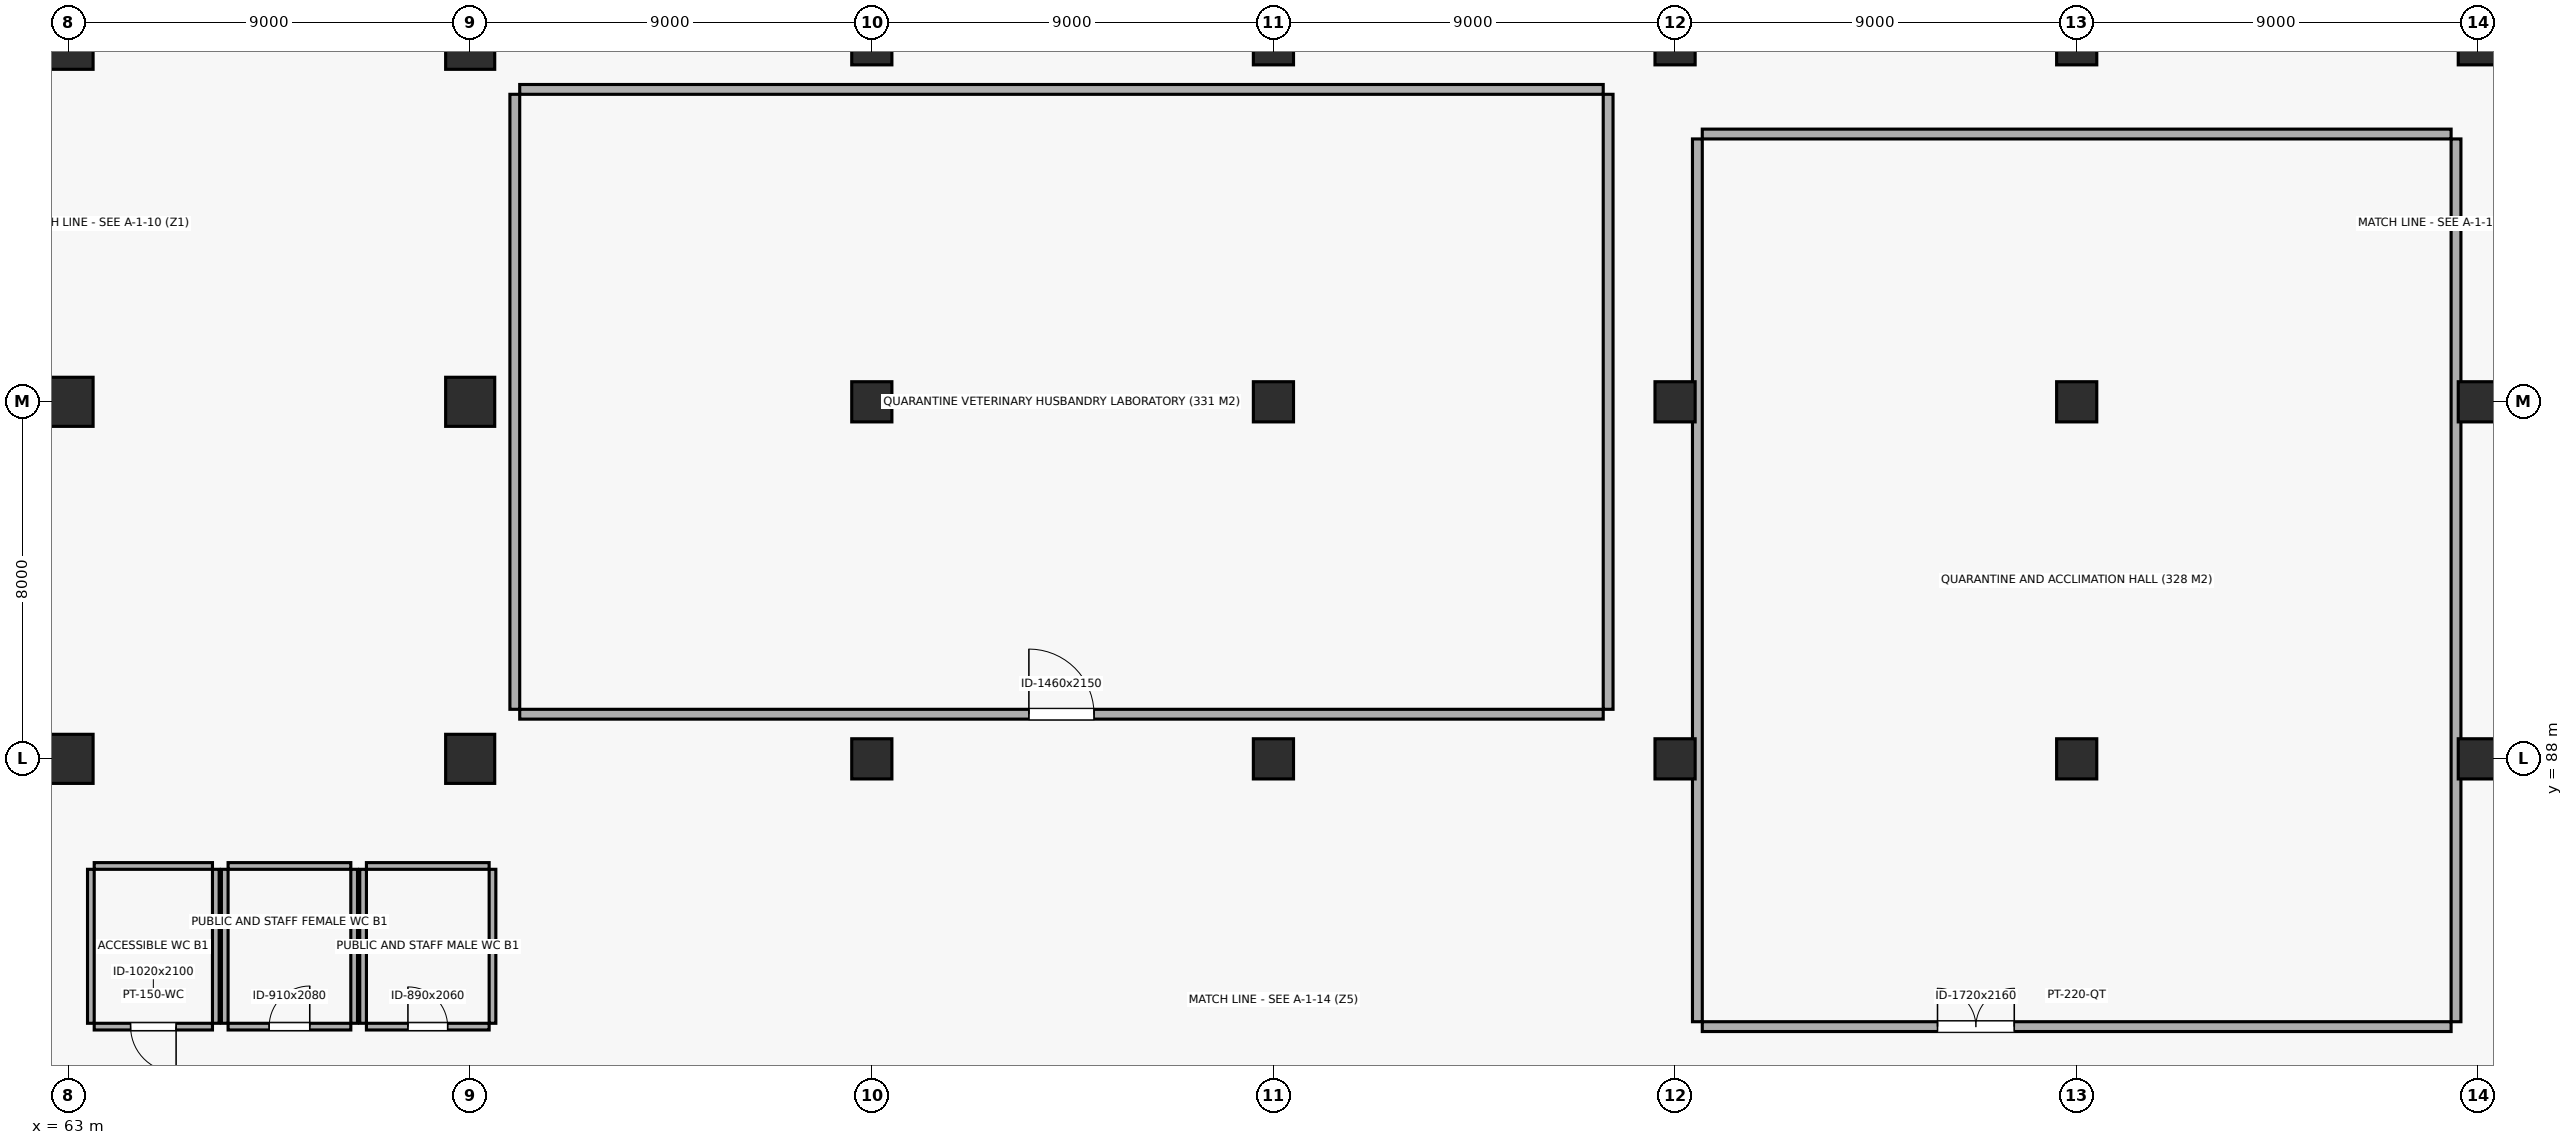
"""IFC4 building model, lengths in metres.
Left out: names, types, materials, properties, quantities, classifications, styles, units other than length and angle.
Written with IfcOpenShell. Run it as: python <this file> out.ifc"""

import sys

from ifc_helpers import new_model, si_unit, direction, frame, frame_2d, origin, origin_2d, place, context, subcontext, project, spatial, rectangle, extrude, element, fill, save


model = new_model("IFC4")
c1 = context("Model", 3, precision=1e-05, world=origin(), true_north=direction((0.0, 1.0)))
c2 = subcontext(c1, "Body", "Model", "MODEL_VIEW")
j1 = project(units=[si_unit("LENGTHUNIT", "METRE"), si_unit("PLANEANGLEUNIT", "RADIAN")], contexts=[c1])
p1 = place(None, origin())
s1 = spatial("IfcSite", under=j1, at=p1, CompositionType="ELEMENT")
p2 = place(p1, origin())
s2 = spatial("IfcBuilding", under=s1, at=p2, CompositionType="ELEMENT")
p3 = place(p2, frame((0.0, 0.0, -4.5)))
s3 = spatial("IfcBuildingStorey", under=s2, at=p3, CompositionType="ELEMENT", Elevation=-4.5)
for number, where, z_axis, x_axis in (
    (1, (63.0, 88.0, 0.0), (0.0, 0.0, 1.0), (1.0, 0.0, 0.0)),
    (2, (63.0, 96.0, 0.0), (0.0, 0.0, 1.0), (1.0, 0.0, 0.0)),
    (3, (63.0, 104.0, 0.0), (0.0, 0.0, 1.0), (1.0, 0.0, 0.0)),
    (4, (72.0, 88.0, 0.0), (0.0, 0.0, 1.0), (1.0, 0.0, 0.0)),
    (5, (72.0, 96.0, 0.0), (0.0, 0.0, 1.0), (1.0, 0.0, 0.0)),
    (6, (72.0, 104.0, 0.0), (0.0, 0.0, 1.0), (1.0, 0.0, 0.0)),
):
    element("IfcColumn", number, at=place(p3, frame(where, z_axis=z_axis, x_axis=x_axis)), inside=s3, PredefinedType="COLUMN", context=c2, shape_type="SweptSolid", body=[
        extrude(rectangle(XDim=1.1, YDim=1.1, at=origin_2d()), origin(), (0.0, 0.0, 1.0), 4.5),
    ])
for number, where, z_axis, x_axis in (
    (7, (81.0, 88.0, 0.0), (0.0, 0.0, 1.0), (1.0, 0.0, 0.0)),
    (8, (81.0, 96.0, 0.0), (0.0, 0.0, 1.0), (1.0, 0.0, 0.0)),
    (9, (81.0, 104.0, 0.0), (0.0, 0.0, 1.0), (1.0, 0.0, 0.0)),
    (10, (90.0, 88.0, 0.0), (0.0, 0.0, 1.0), (1.0, 0.0, 0.0)),
    (11, (90.0, 96.0, 0.0), (0.0, 0.0, 1.0), (1.0, 0.0, 0.0)),
    (12, (90.0, 104.0, 0.0), (0.0, 0.0, 1.0), (1.0, 0.0, 0.0)),
    (13, (99.0, 88.0, 0.0), (0.0, 0.0, 1.0), (1.0, 0.0, 0.0)),
    (14, (99.0, 96.0, 0.0), (0.0, 0.0, 1.0), (1.0, 0.0, 0.0)),
    (15, (99.0, 104.0, 0.0), (0.0, 0.0, 1.0), (1.0, 0.0, 0.0)),
    (16, (108.0, 88.0, 0.0), (0.0, 0.0, 1.0), (1.0, 0.0, 0.0)),
    (17, (108.0, 96.0, 0.0), (0.0, 0.0, 1.0), (1.0, 0.0, 0.0)),
    (18, (108.0, 104.0, 0.0), (0.0, 0.0, 1.0), (1.0, 0.0, 0.0)),
    (19, (117.0, 88.0, 0.0), (0.0, 0.0, 1.0), (1.0, 0.0, 0.0)),
    (20, (117.0, 96.0, 0.0), (0.0, 0.0, 1.0), (1.0, 0.0, 0.0)),
    (21, (117.0, 104.0, 0.0), (0.0, 0.0, 1.0), (1.0, 0.0, 0.0)),
):
    element("IfcColumn", number, at=place(p3, frame(where, z_axis=z_axis, x_axis=x_axis)), inside=s3, PredefinedType="COLUMN", context=c2, shape_type="SweptSolid", body=[
        extrude(rectangle(XDim=0.9, YDim=0.9, at=origin_2d()), origin(), (0.0, 0.0, 1.0), 4.5),
    ])
p4 = place(p3, frame((99.61, 82.0, 0.0), z_axis=(0.0, 0.0, 1.0), x_axis=(1.0, 0.0, 0.0)))
e22 = element("IfcWall", 22, at=p4, inside=s3, PredefinedType="PARTITIONING", context=c2, shape_type="SweptSolid", body=[
    extrude(rectangle(XDim=16.78, YDim=0.22, at=frame_2d((8.39, 0.0))), origin(), (0.0, 0.0, 1.0), 4.15),
])
p5 = place(p4, frame((5.271, 0.0, 0.0)))
e23 = element("IfcOpeningElement", 23, at=p5, cuts=e22, PredefinedType="OPENING", context=c2, shape_type="SweptSolid", body=[
    extrude(rectangle(XDim=1.72, YDim=2.16, at=frame_2d((0.86, 1.08))), frame((0.0, 0.122, 0.0), z_axis=(0.0, -1.0, 0.0), x_axis=(1.0, 0.0, 0.0)), (0.0, 0.0, 1.0), 0.244),
])
p6 = place(p3, frame((99.61, 102.0, 0.0), z_axis=(0.0, 0.0, 1.0), x_axis=(1.0, 0.0, 0.0)))
e24 = element("IfcWall", 24, at=p6, inside=s3, PredefinedType="PARTITIONING", context=c2, shape_type="SweptSolid", body=[
    extrude(rectangle(XDim=16.78, YDim=0.22, at=frame_2d((8.39, 0.0))), origin(), (0.0, 0.0, 1.0), 4.15),
])
for number, where, z_axis, x_axis in (
    (25, (99.5, 82.11, 0.0), (0.0, 0.0, 1.0), (0.0, 1.0, 0.0)),
    (26, (116.5, 82.11, 0.0), (0.0, 0.0, 1.0), (0.0, 1.0, 0.0)),
):
    element("IfcWall", number, at=place(p3, frame(where, z_axis=z_axis, x_axis=x_axis)), inside=s3, PredefinedType="PARTITIONING", context=c2, shape_type="SweptSolid", body=[
        extrude(rectangle(XDim=19.78, YDim=0.22, at=frame_2d((9.89, 0.0))), origin(), (0.0, 0.0, 1.0), 4.15),
    ])
p7 = place(p3, frame((73.11, 89.0, 0.0), z_axis=(0.0, 0.0, 1.0), x_axis=(1.0, 0.0, 0.0)))
e27 = element("IfcWall", 27, at=p7, inside=s3, PredefinedType="PARTITIONING", context=c2, shape_type="SweptSolid", body=[
    extrude(rectangle(XDim=24.28, YDim=0.22, at=frame_2d((12.14, 0.0))), origin(), (0.0, 0.0, 1.0), 4.15),
])
p8 = place(p7, frame((11.41, 0.0, 0.0)))
e28 = element("IfcOpeningElement", 28, at=p8, cuts=e27, PredefinedType="OPENING", context=c2, shape_type="SweptSolid", body=[
    extrude(rectangle(XDim=1.46, YDim=2.15, at=frame_2d((0.73, 1.075))), frame((0.0, 0.122, 0.0), z_axis=(0.0, -1.0, 0.0), x_axis=(1.0, 0.0, 0.0)), (0.0, 0.0, 1.0), 0.244),
])
p9 = place(p3, frame((73.11, 103.0, 0.0), z_axis=(0.0, 0.0, 1.0), x_axis=(1.0, 0.0, 0.0)))
e29 = element("IfcWall", 29, at=p9, inside=s3, PredefinedType="PARTITIONING", context=c2, shape_type="SweptSolid", body=[
    extrude(rectangle(XDim=24.28, YDim=0.22, at=frame_2d((12.14, 0.0))), origin(), (0.0, 0.0, 1.0), 4.15),
])
for number, where, z_axis, x_axis in (
    (30, (73.0, 89.11, 0.0), (0.0, 0.0, 1.0), (0.0, 1.0, 0.0)),
    (31, (97.5, 89.11, 0.0), (0.0, 0.0, 1.0), (0.0, 1.0, 0.0)),
):
    element("IfcWall", number, at=place(p3, frame(where, z_axis=z_axis, x_axis=x_axis)), inside=s3, PredefinedType="PARTITIONING", context=c2, shape_type="SweptSolid", body=[
        extrude(rectangle(XDim=13.78, YDim=0.22, at=frame_2d((6.89, 0.0))), origin(), (0.0, 0.0, 1.0), 4.15),
    ])
p10 = place(p3, frame((63.575, 82.0, 0.0), z_axis=(0.0, 0.0, 1.0), x_axis=(1.0, 0.0, 0.0)))
e32 = element("IfcWall", 32, at=p10, inside=s3, PredefinedType="PARTITIONING", context=c2, shape_type="SweptSolid", body=[
    extrude(rectangle(XDim=2.65, YDim=0.15, at=frame_2d((1.325, 0.0))), origin(), (0.0, 0.0, 1.0), 4.15),
])
p11 = place(p10, frame((0.815, 0.0, 0.0)))
e33 = element("IfcOpeningElement", 33, at=p11, cuts=e32, PredefinedType="OPENING", context=c2, shape_type="SweptSolid", body=[
    extrude(rectangle(XDim=1.02, YDim=2.1, at=frame_2d((0.51, 1.05))), frame((0.0, 0.087, 0.0), z_axis=(0.0, -1.0, 0.0), x_axis=(1.0, 0.0, 0.0)), (0.0, 0.0, 1.0), 0.174),
])
p12 = place(p3, frame((63.575, 85.6, 0.0), z_axis=(0.0, 0.0, 1.0), x_axis=(1.0, 0.0, 0.0)))
e34 = element("IfcWall", 34, at=p12, inside=s3, PredefinedType="PARTITIONING", context=c2, shape_type="SweptSolid", body=[
    extrude(rectangle(XDim=2.65, YDim=0.15, at=frame_2d((1.325, 0.0))), origin(), (0.0, 0.0, 1.0), 4.15),
])
for number, where, z_axis, x_axis in (
    (35, (63.5, 82.075, 0.0), (0.0, 0.0, 1.0), (0.0, 1.0, 0.0)),
    (36, (66.3, 82.075, 0.0), (0.0, 0.0, 1.0), (0.0, 1.0, 0.0)),
):
    element("IfcWall", number, at=place(p3, frame(where, z_axis=z_axis, x_axis=x_axis)), inside=s3, PredefinedType="PARTITIONING", context=c2, shape_type="SweptSolid", body=[
        extrude(rectangle(XDim=3.45, YDim=0.15, at=frame_2d((1.725, 0.0))), origin(), (0.0, 0.0, 1.0), 4.15),
    ])
p13 = place(p3, frame((66.575, 82.0, 0.0), z_axis=(0.0, 0.0, 1.0), x_axis=(1.0, 0.0, 0.0)))
e37 = element("IfcWall", 37, at=p13, inside=s3, PredefinedType="PARTITIONING", context=c2, shape_type="SweptSolid", body=[
    extrude(rectangle(XDim=2.75, YDim=0.15, at=frame_2d((1.375, 0.0))), origin(), (0.0, 0.0, 1.0), 4.15),
])
p14 = place(p13, frame((0.92, 0.0, 0.0)))
e38 = element("IfcOpeningElement", 38, at=p14, cuts=e37, PredefinedType="OPENING", context=c2, shape_type="SweptSolid", body=[
    extrude(rectangle(XDim=0.91, YDim=2.08, at=frame_2d((0.455, 1.04))), frame((0.0, 0.087, 0.0), z_axis=(0.0, -1.0, 0.0), x_axis=(1.0, 0.0, 0.0)), (0.0, 0.0, 1.0), 0.174),
])
p15 = place(p3, frame((66.575, 85.6, 0.0), z_axis=(0.0, 0.0, 1.0), x_axis=(1.0, 0.0, 0.0)))
e39 = element("IfcWall", 39, at=p15, inside=s3, PredefinedType="PARTITIONING", context=c2, shape_type="SweptSolid", body=[
    extrude(rectangle(XDim=2.75, YDim=0.15, at=frame_2d((1.375, 0.0))), origin(), (0.0, 0.0, 1.0), 4.15),
])
for number, where, z_axis, x_axis in (
    (40, (66.5, 82.075, 0.0), (0.0, 0.0, 1.0), (0.0, 1.0, 0.0)),
    (41, (69.4, 82.075, 0.0), (0.0, 0.0, 1.0), (0.0, 1.0, 0.0)),
):
    element("IfcWall", number, at=place(p3, frame(where, z_axis=z_axis, x_axis=x_axis)), inside=s3, PredefinedType="PARTITIONING", context=c2, shape_type="SweptSolid", body=[
        extrude(rectangle(XDim=3.45, YDim=0.15, at=frame_2d((1.725, 0.0))), origin(), (0.0, 0.0, 1.0), 4.15),
    ])
p16 = place(p3, frame((69.675, 82.0, 0.0), z_axis=(0.0, 0.0, 1.0), x_axis=(1.0, 0.0, 0.0)))
e42 = element("IfcWall", 42, at=p16, inside=s3, PredefinedType="PARTITIONING", context=c2, shape_type="SweptSolid", body=[
    extrude(rectangle(XDim=2.75, YDim=0.15, at=frame_2d((1.375, 0.0))), origin(), (0.0, 0.0, 1.0), 4.15),
])
p17 = place(p16, frame((0.93, 0.0, 0.0)))
e43 = element("IfcOpeningElement", 43, at=p17, cuts=e42, PredefinedType="OPENING", context=c2, shape_type="SweptSolid", body=[
    extrude(rectangle(XDim=0.89, YDim=2.06, at=frame_2d((0.445, 1.03))), frame((0.0, 0.087, 0.0), z_axis=(0.0, -1.0, 0.0), x_axis=(1.0, 0.0, 0.0)), (0.0, 0.0, 1.0), 0.174),
])
p18 = place(p3, frame((69.675, 85.6, 0.0), z_axis=(0.0, 0.0, 1.0), x_axis=(1.0, 0.0, 0.0)))
e44 = element("IfcWall", 44, at=p18, inside=s3, PredefinedType="PARTITIONING", context=c2, shape_type="SweptSolid", body=[
    extrude(rectangle(XDim=2.75, YDim=0.15, at=frame_2d((1.375, 0.0))), origin(), (0.0, 0.0, 1.0), 4.15),
])
for number, where, z_axis, x_axis in (
    (45, (69.6, 82.075, 0.0), (0.0, 0.0, 1.0), (0.0, 1.0, 0.0)),
    (46, (72.5, 82.075, 0.0), (0.0, 0.0, 1.0), (0.0, 1.0, 0.0)),
):
    element("IfcWall", number, at=place(p3, frame(where, z_axis=z_axis, x_axis=x_axis)), inside=s3, PredefinedType="PARTITIONING", context=c2, shape_type="SweptSolid", body=[
        extrude(rectangle(XDim=3.45, YDim=0.15, at=frame_2d((1.725, 0.0))), origin(), (0.0, 0.0, 1.0), 4.15),
    ])
p19 = place(p5, origin())
e47 = element("IfcDoor", 47, at=p19, inside=s3, OperationType="DOUBLE_DOOR_SINGLE_SWING", PredefinedType="DOOR", context=c2, shape_type="SweptSolid", body=[
    extrude(rectangle(XDim=1.72, YDim=2.16, at=frame_2d((0.86, 1.08))), frame((0.0, 0.025, 0.0), z_axis=(0.0, -1.0, 0.0), x_axis=(1.0, 0.0, 0.0)), (0.0, 0.0, 1.0), 0.05),
])
fill(e23, e47)
p20 = place(p8, origin())
e48 = element("IfcDoor", 48, at=p20, inside=s3, OperationType="SINGLE_SWING_LEFT", PredefinedType="DOOR", context=c2, shape_type="SweptSolid", body=[
    extrude(rectangle(XDim=1.46, YDim=2.15, at=frame_2d((0.73, 1.075))), frame((0.0, 0.025, 0.0), z_axis=(0.0, -1.0, 0.0), x_axis=(1.0, 0.0, 0.0)), (0.0, 0.0, 1.0), 0.05),
])
fill(e28, e48)
p21 = place(p11, frame((1.02, 0.0, 0.0), z_axis=(0.0, 0.0, 1.0), x_axis=(-1.0, 0.0, 0.0)))
e49 = element("IfcDoor", 49, at=p21, inside=s3, OperationType="SINGLE_SWING_LEFT", PredefinedType="DOOR", context=c2, shape_type="SweptSolid", body=[
    extrude(rectangle(XDim=1.02, YDim=2.1, at=frame_2d((0.51, 1.05))), frame((0.0, 0.025, 0.0), z_axis=(0.0, -1.0, 0.0), x_axis=(1.0, 0.0, 0.0)), (0.0, 0.0, 1.0), 0.05),
])
fill(e33, e49)
p22 = place(p14, origin())
e50 = element("IfcDoor", 50, at=p22, inside=s3, OperationType="SINGLE_SWING_RIGHT", PredefinedType="DOOR", context=c2, shape_type="SweptSolid", body=[
    extrude(rectangle(XDim=0.91, YDim=2.08, at=frame_2d((0.455, 1.04))), frame((0.0, 0.025, 0.0), z_axis=(0.0, -1.0, 0.0), x_axis=(1.0, 0.0, 0.0)), (0.0, 0.0, 1.0), 0.05),
])
fill(e38, e50)
p23 = place(p17, origin())
e51 = element("IfcDoor", 51, at=p23, inside=s3, OperationType="SINGLE_SWING_LEFT", PredefinedType="DOOR", context=c2, shape_type="SweptSolid", body=[
    extrude(rectangle(XDim=0.89, YDim=2.06, at=frame_2d((0.445, 1.03))), frame((0.0, 0.025, 0.0), z_axis=(0.0, -1.0, 0.0), x_axis=(1.0, 0.0, 0.0)), (0.0, 0.0, 1.0), 0.05),
])
fill(e43, e51)
save(model, sys.argv[1])
